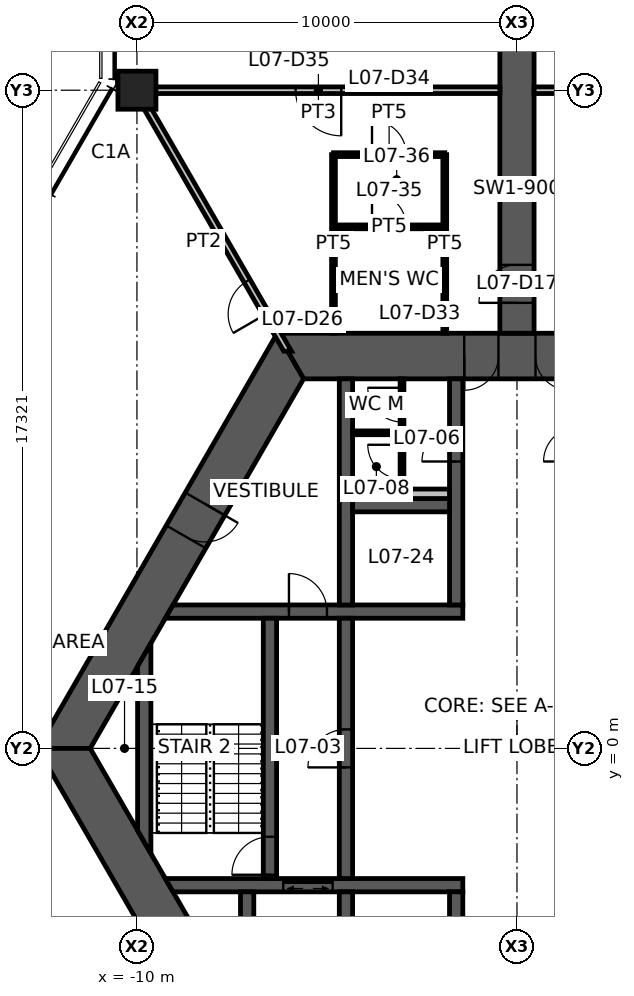
"""IFC4 building model, lengths in metres.
Left out: names, types, materials, properties, quantities, classifications, styles, units other than length and angle.
Written with IfcOpenShell. Run it as: python <this file> out.ifc"""

import sys

from ifc_helpers import new_model, si_unit, direction, frame, frame_2d, origin, origin_2d, place, context, subcontext, project, spatial, polyline, rectangle, hollow_rectangle, outline, extrude, element, fill, save


model = new_model("IFC4")
c1 = context("Model", 3, precision=1e-05, world=origin(), true_north=direction((0.0, 1.0)))
c2 = subcontext(c1, "Body", "Model", "MODEL_VIEW")
j1 = project(units=[si_unit("LENGTHUNIT", "METRE"), si_unit("PLANEANGLEUNIT", "RADIAN")], contexts=[c1])
p1 = place(None, origin())
s1 = spatial("IfcSite", under=j1, at=p1, CompositionType="ELEMENT")
p2 = place(p1, origin())
s2 = spatial("IfcBuilding", under=s1, at=p2, CompositionType="ELEMENT")
p3 = place(p2, frame((0.0, 0.0, 26.8)))
s3 = spatial("IfcBuildingStorey", under=s2, at=p3, CompositionType="ELEMENT", Elevation=26.8)
p4 = place(p3, frame((-10.0, 17.321, 0.0), z_axis=(0.0, 0.0, 1.0), x_axis=(1.0, 0.0, 0.0)))
e1 = element("IfcColumn", 1, at=p4, inside=s3, PredefinedType="COLUMN", context=c2, shape_type="SweptSolid", body=[
    extrude(hollow_rectangle(XDim=1.0, YDim=1.0, WallThickness=0.06, at=origin_2d()), origin(), (0.0, 0.0, 1.0), 4.2),
])
p5 = place(p3, frame((5.961, 10.325, 0.0), z_axis=(0.0, 0.0, 1.0), x_axis=(-1.0, 0.0, 0.0)))
e2 = element("IfcWall", 2, at=p5, inside=s3, PredefinedType="SHEAR", context=c2, shape_type="SweptSolid", body=[
    extrude(outline(polyline([(-0.346, -0.6), (4.574, -0.6), (5.474, -0.6), (6.449, -0.6), (7.349, -0.6), (12.269, -0.6), (11.576, 0.6), (7.349, 0.6), (6.449, 0.6), (5.474, 0.6), (4.574, 0.6), (0.346, 0.6), (-0.346, -0.6)])), origin(), (0.0, 0.0, 1.0), 4.2),
])
p6 = place(p5, frame((6.449, 0.0, 0.0)))
e3 = element("IfcOpeningElement", 3, at=p6, cuts=e2, PredefinedType="OPENING", context=c2, shape_type="SweptSolid", body=[
    extrude(rectangle(XDim=0.9, YDim=2.1, at=frame_2d((0.45, 1.05))), frame((0.0, 0.61, 0.0), z_axis=(0.0, -1.0, 0.0), x_axis=(1.0, 0.0, 0.0)), (0.0, 0.0, 1.0), 1.22),
])
p7 = place(p5, frame((4.574, 0.0, 0.0)))
e4 = element("IfcOpeningElement", 4, at=p7, cuts=e2, PredefinedType="OPENING", context=c2, shape_type="SweptSolid", body=[
    extrude(rectangle(XDim=0.9, YDim=2.1, at=frame_2d((0.45, 1.05))), frame((0.0, 0.61, 0.0), z_axis=(0.0, -1.0, 0.0), x_axis=(1.0, 0.0, 0.0)), (0.0, 0.0, 1.0), 1.22),
])
p8 = place(p3, frame((-5.961, 10.325, 0.0), z_axis=(0.0, 0.0, 1.0), x_axis=(-0.500004296715, -0.866022923061, 0.0)))
e5 = element("IfcWall", 5, at=p8, inside=s3, PredefinedType="SHEAR", context=c2, shape_type="SweptSolid", body=[
    extrude(outline(polyline([(-0.346, -0.6), (4.494, -0.6), (5.494, -0.6), (12.269, -0.6), (11.576, 0.6), (5.494, 0.6), (4.494, 0.6), (0.346, 0.6), (-0.346, -0.6)])), origin(), (0.0, 0.0, 1.0), 4.2),
])
p9 = place(p8, frame((4.494, 0.0, 0.0)))
e6 = element("IfcOpeningElement", 6, at=p9, cuts=e5, PredefinedType="OPENING", context=c2, shape_type="SweptSolid", body=[
    extrude(rectangle(XDim=1.0, YDim=2.1, at=frame_2d((0.5, 1.05))), frame((0.0, 0.61, 0.0), z_axis=(0.0, -1.0, 0.0), x_axis=(1.0, 0.0, 0.0)), (0.0, 0.0, 1.0), 1.22),
])
p10 = place(p3, frame((-11.922, 0.0, 0.0), z_axis=(0.0, 0.0, 1.0), x_axis=(0.500004296715, -0.866022923061, 0.0)))
e7 = element("IfcWall", 7, at=p10, inside=s3, PredefinedType="SHEAR", context=c2, shape_type="SweptSolid", body=[
    extrude(outline(polyline([(-0.346, -0.6), (6.431, -0.6), (7.231, -0.6), (12.269, -0.6), (11.576, 0.6), (7.231, 0.6), (6.431, 0.6), (0.346, 0.6), (-0.346, -0.6)])), origin(), (0.0, 0.0, 1.0), 4.2),
])
p11 = place(p10, frame((6.431, 0.0, 0.0)))
e8 = element("IfcOpeningElement", 8, at=p11, cuts=e7, PredefinedType="OPENING", context=c2, shape_type="SweptSolid", body=[
    extrude(rectangle(XDim=0.8, YDim=2.1, at=frame_2d((0.4, 1.05))), frame((0.0, 0.61, 0.0), z_axis=(0.0, -1.0, 0.0), x_axis=(1.0, 0.0, 0.0)), (0.0, 0.0, 1.0), 1.22),
])
p12 = place(p3, frame((0.0, 10.925, 0.0), z_axis=(0.0, 0.0, 1.0), x_axis=(0.0, 1.0, 0.0)))
e9 = element("IfcWall", 9, at=p12, inside=s3, PredefinedType="SHEAR", context=c2, shape_type="SweptSolid", body=[
    extrude(rectangle(XDim=7.595, YDim=0.9, at=frame_2d((3.798, 0.0))), origin(), (0.0, 0.0, 1.0), 4.2),
])
p13 = place(p12, frame((0.8, 0.0, 0.0)))
e10 = element("IfcOpeningElement", 10, at=p13, cuts=e9, PredefinedType="OPENING", context=c2, shape_type="SweptSolid", body=[
    extrude(rectangle(XDim=1.0, YDim=2.1, at=frame_2d((0.5, 1.05))), frame((0.0, 0.46, 0.0), z_axis=(0.0, -1.0, 0.0), x_axis=(1.0, 0.0, 0.0)), (0.0, 0.0, 1.0), 0.92),
])
p14 = place(p3, frame((-9.151, 3.6, 0.0), z_axis=(0.0, 0.0, 1.0), x_axis=(1.0, 0.0, 0.0)))
e11 = element("IfcWall", 11, at=p14, inside=s3, PredefinedType="SHEAR", context=c2, shape_type="SweptSolid", body=[
    extrude(outline(polyline([(-0.101, -0.175), (3.151, -0.175), (4.151, -0.175), (7.726, -0.175), (7.726, 0.175), (4.151, 0.175), (3.151, 0.175), (0.101, 0.175), (-0.101, -0.175)])), origin(), (0.0, 0.0, 1.0), 4.2),
])
p15 = place(p14, frame((3.151, 0.0, 0.0)))
e12 = element("IfcOpeningElement", 12, at=p15, cuts=e11, PredefinedType="OPENING", context=c2, shape_type="SweptSolid", body=[
    extrude(rectangle(XDim=1.0, YDim=2.1, at=frame_2d((0.5, 1.05))), frame((0.0, 0.185, 0.0), z_axis=(0.0, -1.0, 0.0), x_axis=(1.0, 0.0, 0.0)), (0.0, 0.0, 1.0), 0.37),
])
p16 = place(p3, frame((-9.151, -3.6, 0.0), z_axis=(0.0, 0.0, 1.0), x_axis=(1.0, 0.0, 0.0)))
e13 = element("IfcWall", 13, at=p16, inside=s3, PredefinedType="SHEAR", context=c2, shape_type="SweptSolid", body=[
    extrude(outline(polyline([(0.101, -0.175), (3.001, -0.175), (4.301, -0.175), (7.726, -0.175), (7.726, 0.175), (4.301, 0.175), (3.001, 0.175), (-0.101, 0.175), (0.101, -0.175)])), origin(), (0.0, 0.0, 1.0), 4.2),
])
p17 = place(p16, frame((3.001, 0.0, 0.0)))
e14 = element("IfcOpeningElement", 14, at=p17, cuts=e13, PredefinedType="OPENING", context=c2, shape_type="SweptSolid", body=[
    extrude(rectangle(XDim=1.3, YDim=2.1, at=frame_2d((0.65, 1.05))), frame((0.0, 0.185, 0.0), z_axis=(0.0, -1.0, 0.0), x_axis=(1.0, 0.0, 0.0)), (0.0, 0.0, 1.0), 0.37),
])
p18 = place(p3, frame((-1.6, 3.775, 0.0), z_axis=(0.0, 0.0, 1.0), x_axis=(0.0, 1.0, 0.0)))
e15 = element("IfcWall", 15, at=p18, inside=s3, PredefinedType="SHEAR", context=c2, shape_type="SweptSolid", body=[
    extrude(rectangle(XDim=5.95, YDim=0.35, at=frame_2d((2.975, 0.0))), origin(), (0.0, 0.0, 1.0), 4.2),
])
p19 = place(p18, frame((3.775, 0.0, 0.0)))
e16 = element("IfcOpeningElement", 16, at=p19, cuts=e15, PredefinedType="OPENING", context=c2, shape_type="SweptSolid", body=[
    extrude(rectangle(XDim=0.9, YDim=2.1, at=frame_2d((0.45, 1.05))), frame((0.0, 0.185, 0.0), z_axis=(0.0, -1.0, 0.0), x_axis=(1.0, 0.0, 0.0)), (0.0, 0.0, 1.0), 0.37),
])
p20 = place(p3, frame((-1.6, -3.775, 0.0), z_axis=(0.0, 0.0, 1.0), x_axis=(0.0, -1.0, 0.0)))
e17 = element("IfcWall", 17, at=p20, inside=s3, PredefinedType="SHEAR", context=c2, shape_type="SweptSolid", body=[
    extrude(rectangle(XDim=5.95, YDim=0.35, at=frame_2d((2.975, 0.0))), origin(), (0.0, 0.0, 1.0), 4.2),
])
p21 = place(p20, frame((3.775, 0.0, 0.0)))
e18 = element("IfcOpeningElement", 18, at=p21, cuts=e17, PredefinedType="OPENING", context=c2, shape_type="SweptSolid", body=[
    extrude(rectangle(XDim=0.9, YDim=2.1, at=frame_2d((0.45, 1.05))), frame((0.0, 0.185, 0.0), z_axis=(0.0, -1.0, 0.0), x_axis=(1.0, 0.0, 0.0)), (0.0, 0.0, 1.0), 0.37),
])
p22 = place(p3, frame((-4.5, -3.425, 0.0), z_axis=(0.0, 0.0, 1.0), x_axis=(0.0, 1.0, 0.0)))
e19 = element("IfcWall", 19, at=p22, inside=s3, PredefinedType="SHEAR", context=c2, shape_type="SweptSolid", body=[
    extrude(rectangle(XDim=6.85, YDim=0.35, at=frame_2d((3.425, 0.0))), origin(), (0.0, 0.0, 1.0), 4.2),
])
p23 = place(p22, frame((2.925, 0.0, 0.0)))
e20 = element("IfcOpeningElement", 20, at=p23, cuts=e19, PredefinedType="OPENING", context=c2, shape_type="SweptSolid", body=[
    extrude(rectangle(XDim=1.0, YDim=2.1, at=frame_2d((0.5, 1.05))), frame((0.0, 0.185, 0.0), z_axis=(0.0, -1.0, 0.0), x_axis=(1.0, 0.0, 0.0)), (0.0, 0.0, 1.0), 0.37),
])
p24 = place(p3, frame((-6.5, -3.425, 0.0), z_axis=(0.0, 0.0, 1.0), x_axis=(0.0, 1.0, 0.0)))
e21 = element("IfcWall", 21, at=p24, inside=s3, PredefinedType="SHEAR", context=c2, shape_type="SweptSolid", body=[
    extrude(rectangle(XDim=6.85, YDim=0.35, at=frame_2d((3.425, 0.0))), origin(), (0.0, 0.0, 1.0), 4.2),
])
p25 = place(p24, frame((0.1, 0.0, 0.0)))
e22 = element("IfcOpeningElement", 22, at=p25, cuts=e21, PredefinedType="OPENING", context=c2, shape_type="SweptSolid", body=[
    extrude(rectangle(XDim=1.0, YDim=2.1, at=frame_2d((0.5, 1.05))), frame((0.0, 0.185, 0.0), z_axis=(0.0, -1.0, 0.0), x_axis=(1.0, 0.0, 0.0)), (0.0, 0.0, 1.0), 0.37),
])
for number, where, z_axis, x_axis in (
    (23, (-4.5, 3.775, 0.0), (0.0, 0.0, 1.0), (0.0, 1.0, 0.0)),
    (24, (-4.5, -3.775, 0.0), (0.0, 0.0, 1.0), (0.0, -1.0, 0.0)),
):
    element("IfcWall", number, at=place(p3, frame(where, z_axis=z_axis, x_axis=x_axis)), inside=s3, PredefinedType="SHEAR", context=c2, shape_type="SweptSolid", body=[
        extrude(rectangle(XDim=5.95, YDim=0.35, at=frame_2d((2.975, 0.0))), origin(), (0.0, 0.0, 1.0), 4.2),
    ])
p26 = place(p3, frame((-4.325, 6.4, 0.0), z_axis=(0.0, 0.0, 1.0), x_axis=(1.0, 0.0, 0.0)))
e25 = element("IfcWall", 25, at=p26, inside=s3, PredefinedType="SHEAR", context=c2, shape_type="SweptSolid", body=[
    extrude(rectangle(XDim=2.55, YDim=0.35, at=frame_2d((1.275, 0.0))), origin(), (0.0, 0.0, 1.0), 4.2),
])
p27 = place(p3, frame((-7.1, -3.775, 0.0), z_axis=(0.0, 0.0, 1.0), x_axis=(0.0, -1.0, 0.0)))
e26 = element("IfcWall", 26, at=p27, inside=s3, PredefinedType="SHEAR", context=c2, shape_type="SweptSolid", body=[
    extrude(outline(polyline([(0.0, -0.175), (3.074, -0.175), (3.377, 0.0), (3.4, 0.175), (0.0, 0.175), (0.0, -0.175)])), origin(), (0.0, 0.0, 1.0), 4.2),
])
p28 = place(p3, frame((-9.808, -2.462, 0.0), z_axis=(0.0, 0.0, 1.0), x_axis=(0.0, 1.0, 0.0)))
e27 = element("IfcWall", 27, at=p28, inside=s3, PredefinedType="SHEAR", context=c2, shape_type="SweptSolid", body=[
    extrude(outline(polyline([(-0.303, -0.175), (5.228, -0.175), (4.621, 0.175), (0.303, 0.175), (-0.303, -0.175)])), origin(), (0.0, 0.0, 1.0), 4.2),
])
p29 = place(p3, frame((-4.325, 6.7, 0.0), z_axis=(0.0, 0.0, 1.0), x_axis=(1.0, 0.0, 0.0)))
e28 = element("IfcWall", 28, at=p29, inside=s3, PredefinedType="PLUMBINGWALL", context=c2, shape_type="SweptSolid", body=[
    extrude(rectangle(XDim=2.55, YDim=0.25, at=frame_2d((1.275, 0.0))), origin(), (0.0, 0.0, 1.0), 4.2),
])
p30 = place(p3, frame((-3.025, 6.575, 0.0), z_axis=(0.0, 0.0, 1.0), x_axis=(0.0, 1.0, 0.0)))
e29 = element("IfcWall", 29, at=p30, inside=s3, PredefinedType="PARTITIONING", context=c2, shape_type="SweptSolid", body=[
    extrude(rectangle(XDim=3.15, YDim=0.1, at=frame_2d((1.575, 0.0))), origin(), (0.0, 0.0, 1.0), 3.23),
])
p31 = place(p30, frame((2.015, 0.0, 0.0)))
e30 = element("IfcOpeningElement", 30, at=p31, cuts=e29, PredefinedType="OPENING", context=c2, shape_type="SweptSolid", body=[
    extrude(rectangle(XDim=0.9, YDim=2.1, at=frame_2d((0.45, 1.05))), frame((0.0, 0.06, 0.0), z_axis=(0.0, -1.0, 0.0), x_axis=(1.0, 0.0, 0.0)), (0.0, 0.0, 1.0), 0.12),
])
p32 = place(p30, frame((0.515, 0.0, 0.0)))
e31 = element("IfcOpeningElement", 31, at=p32, cuts=e29, PredefinedType="OPENING", context=c2, shape_type="SweptSolid", body=[
    extrude(rectangle(XDim=0.9, YDim=2.1, at=frame_2d((0.45, 1.05))), frame((0.0, 0.06, 0.0), z_axis=(0.0, -1.0, 0.0), x_axis=(1.0, 0.0, 0.0)), (0.0, 0.0, 1.0), 0.12),
])
p33 = place(p3, frame((-3.075, 8.305, 0.0), z_axis=(0.0, 0.0, 1.0), x_axis=(-1.0, 0.0, 0.0)))
e32 = element("IfcWall", 32, at=p33, inside=s3, PredefinedType="PARTITIONING", context=c2, shape_type="SweptSolid", body=[
    extrude(rectangle(XDim=1.25, YDim=0.1, at=frame_2d((0.625, 0.0))), origin(), (0.0, 0.0, 1.0), 3.23),
])
p34 = place(p3, frame((-6.035, 10.453, 0.0), z_axis=(0.0, 0.0, 1.0), x_axis=(-0.499993402427, 0.866029212861, 0.0)))
e33 = element("IfcWall", 33, at=p34, inside=s3, PredefinedType="PARTITIONING", context=c2, shape_type="SweptSolid", body=[
    extrude(outline(polyline([(-0.051, -0.087), (1.129, -0.087), (2.129, -0.087), (7.93, -0.087), (7.93, 0.087), (2.129, 0.087), (1.129, 0.087), (0.051, 0.087), (-0.051, -0.087)])), origin(), (0.0, 0.0, 1.0), 3.33),
])
p35 = place(p34, frame((1.129, 0.0, 0.0)))
e34 = element("IfcOpeningElement", 34, at=p35, cuts=e33, PredefinedType="OPENING", context=c2, shape_type="SweptSolid", body=[
    extrude(rectangle(XDim=1.0, YDim=2.1, at=frame_2d((0.5, 1.05))), frame((0.0, 0.098, 0.0), z_axis=(0.0, -1.0, 0.0), x_axis=(1.0, 0.0, 0.0)), (0.0, 0.0, 1.0), 0.195),
])
p36 = place(p3, frame((0.45, 17.321, 0.0), z_axis=(0.0, 0.0, 1.0), x_axis=(1.0, 0.0, 0.0)))
e35 = element("IfcWall", 35, at=p36, inside=s3, PredefinedType="PARTITIONING", context=c2, shape_type="SweptSolid", body=[
    extrude(rectangle(XDim=9.55, YDim=0.175, at=frame_2d((4.775, 0.0))), origin(), (0.0, 0.0, 1.0), 3.238),
])
p37 = place(p36, frame((4.175, 0.0, 0.0)))
e36 = element("IfcOpeningElement", 36, at=p37, cuts=e35, PredefinedType="OPENING", context=c2, shape_type="SweptSolid", body=[
    extrude(rectangle(XDim=1.2, YDim=2.1, at=frame_2d((0.6, 1.05))), frame((0.0, 0.098, 0.0), z_axis=(0.0, -1.0, 0.0), x_axis=(1.0, 0.0, 0.0)), (0.0, 0.0, 1.0), 0.195),
])
p38 = place(p3, frame((-4.829, 13.725, 0.0), z_axis=(0.0, 0.0, 1.0), x_axis=(1.0, 0.0, 0.0)))
e37 = element("IfcWall", 37, at=p38, inside=s3, PredefinedType="PARTITIONING", context=c2, shape_type="SweptSolid", body=[
    extrude(rectangle(XDim=2.929, YDim=0.1, at=frame_2d((1.464, 0.0))), origin(), (0.0, 0.0, 1.0), 3.23),
])
p39 = place(p38, frame((1.014, 0.0, 0.0)))
e38 = element("IfcOpeningElement", 38, at=p39, cuts=e37, PredefinedType="OPENING", context=c2, shape_type="SweptSolid", body=[
    extrude(rectangle(XDim=0.9, YDim=2.1, at=frame_2d((0.45, 1.05))), frame((0.0, 0.06, 0.0), z_axis=(0.0, -1.0, 0.0), x_axis=(1.0, 0.0, 0.0)), (0.0, 0.0, 1.0), 0.12),
])
p40 = place(p3, frame((-4.829, 15.625, 0.0), z_axis=(0.0, 0.0, 1.0), x_axis=(1.0, 0.0, 0.0)))
e39 = element("IfcWall", 39, at=p40, inside=s3, PredefinedType="PARTITIONING", context=c2, shape_type="SweptSolid", body=[
    extrude(rectangle(XDim=2.929, YDim=0.1, at=frame_2d((1.464, 0.0))), origin(), (0.0, 0.0, 1.0), 3.23),
])
p41 = place(p40, frame((1.014, 0.0, 0.0)))
e40 = element("IfcOpeningElement", 40, at=p41, cuts=e39, PredefinedType="OPENING", context=c2, shape_type="SweptSolid", body=[
    extrude(rectangle(XDim=0.9, YDim=2.1, at=frame_2d((0.45, 1.05))), frame((0.0, 0.06, 0.0), z_axis=(0.0, -1.0, 0.0), x_axis=(1.0, 0.0, 0.0)), (0.0, 0.0, 1.0), 0.12),
])
for number, where, z_axis, x_axis in (
    (41, (-1.9, 10.925, 0.0), (0.0, 0.0, 1.0), (0.0, 1.0, 0.0)),
    (42, (-4.829, 10.925, 0.0), (0.0, 0.0, 1.0), (0.0, 1.0, 0.0)),
):
    element("IfcWall", number, at=place(p3, frame(where, z_axis=z_axis, x_axis=x_axis)), inside=s3, PredefinedType="PARTITIONING", context=c2, shape_type="SweptSolid", body=[
        extrude(rectangle(XDim=4.7, YDim=0.1, at=frame_2d((2.35, 0.0))), origin(), (0.0, 0.0, 1.0), 3.23),
    ])
p42 = place(p3, frame((-0.45, 17.321, 0.0), z_axis=(0.0, 0.0, 1.0), x_axis=(-1.0, 0.0, 0.0)))
e43 = element("IfcWall", 43, at=p42, inside=s3, PredefinedType="PARTITIONING", context=c2, shape_type="SweptSolid", body=[
    extrude(rectangle(XDim=9.55, YDim=0.175, at=frame_2d((4.775, 0.0))), origin(), (0.0, 0.0, 1.0), 3.238),
])
p43 = place(p42, frame((4.175, 0.0, 0.0)))
e44 = element("IfcOpeningElement", 44, at=p43, cuts=e43, PredefinedType="OPENING", context=c2, shape_type="SweptSolid", body=[
    extrude(rectangle(XDim=1.2, YDim=2.1, at=frame_2d((0.6, 1.05))), frame((0.0, 0.098, 0.0), z_axis=(0.0, -1.0, 0.0), x_axis=(1.0, 0.0, 0.0)), (0.0, 0.0, 1.0), 0.195),
])
p44 = place(p6, origin())
e45 = element("IfcDoor", 45, at=p44, inside=s3, OperationType="SINGLE_SWING_RIGHT", PredefinedType="DOOR", context=c2, shape_type="SweptSolid", body=[
    extrude(rectangle(XDim=0.9, YDim=2.1, at=frame_2d((0.45, 1.05))), frame((0.0, 0.025, 0.0), z_axis=(0.0, -1.0, 0.0), x_axis=(1.0, 0.0, 0.0)), (0.0, 0.0, 1.0), 0.05),
])
fill(e3, e45)
p45 = place(p7, origin())
e46 = element("IfcDoor", 46, at=p45, inside=s3, OperationType="SINGLE_SWING_LEFT", PredefinedType="DOOR", context=c2, shape_type="SweptSolid", body=[
    extrude(rectangle(XDim=0.9, YDim=2.1, at=frame_2d((0.45, 1.05))), frame((0.0, 0.025, 0.0), z_axis=(0.0, -1.0, 0.0), x_axis=(1.0, 0.0, 0.0)), (0.0, 0.0, 1.0), 0.05),
])
fill(e4, e46)
p46 = place(p9, origin())
e47 = element("IfcDoor", 47, at=p46, inside=s3, OperationType="SINGLE_SWING_LEFT", PredefinedType="DOOR", context=c2, shape_type="SweptSolid", body=[
    extrude(rectangle(XDim=1.0, YDim=2.1, at=frame_2d((0.5, 1.05))), frame((0.0, 0.025, 0.0), z_axis=(0.0, -1.0, 0.0), x_axis=(1.0, 0.0, 0.0)), (0.0, 0.0, 1.0), 0.05),
])
fill(e6, e47)
p47 = place(p23, origin())
e48 = element("IfcDoor", 48, at=p47, inside=s3, OperationType="SINGLE_SWING_LEFT", PredefinedType="DOOR", context=c2, shape_type="SweptSolid", body=[
    extrude(rectangle(XDim=1.0, YDim=2.1, at=frame_2d((0.5, 1.05))), frame((0.0, 0.025, 0.0), z_axis=(0.0, -1.0, 0.0), x_axis=(1.0, 0.0, 0.0)), (0.0, 0.0, 1.0), 0.05),
])
fill(e20, e48)
p48 = place(p25, origin())
e49 = element("IfcDoor", 49, at=p48, inside=s3, OperationType="SINGLE_SWING_LEFT", PredefinedType="DOOR", context=c2, shape_type="SweptSolid", body=[
    extrude(rectangle(XDim=1.0, YDim=2.1, at=frame_2d((0.5, 1.05))), frame((0.0, 0.025, 0.0), z_axis=(0.0, -1.0, 0.0), x_axis=(1.0, 0.0, 0.0)), (0.0, 0.0, 1.0), 0.05),
])
fill(e22, e49)
p49 = place(p15, origin())
e50 = element("IfcDoor", 50, at=p49, inside=s3, OperationType="SINGLE_SWING_LEFT", PredefinedType="DOOR", context=c2, shape_type="SweptSolid", body=[
    extrude(rectangle(XDim=1.0, YDim=2.1, at=frame_2d((0.5, 1.05))), frame((0.0, 0.025, 0.0), z_axis=(0.0, -1.0, 0.0), x_axis=(1.0, 0.0, 0.0)), (0.0, 0.0, 1.0), 0.05),
])
fill(e12, e50)
p50 = place(p19, origin())
e51 = element("IfcDoor", 51, at=p50, inside=s3, OperationType="SINGLE_SWING_LEFT", PredefinedType="DOOR", context=c2, shape_type="SweptSolid", body=[
    extrude(rectangle(XDim=0.9, YDim=2.1, at=frame_2d((0.45, 1.05))), frame((0.0, 0.025, 0.0), z_axis=(0.0, -1.0, 0.0), x_axis=(1.0, 0.0, 0.0)), (0.0, 0.0, 1.0), 0.05),
])
fill(e16, e51)
p51 = place(p13, origin())
e52 = element("IfcDoor", 52, at=p51, inside=s3, OperationType="SINGLE_SWING_LEFT", PredefinedType="DOOR", context=c2, shape_type="SweptSolid", body=[
    extrude(rectangle(XDim=1.0, YDim=2.1, at=frame_2d((0.5, 1.05))), frame((0.0, 0.025, 0.0), z_axis=(0.0, -1.0, 0.0), x_axis=(1.0, 0.0, 0.0)), (0.0, 0.0, 1.0), 0.05),
])
fill(e10, e52)
p52 = place(p31, origin())
e53 = element("IfcDoor", 53, at=p52, inside=s3, OperationType="SINGLE_SWING_RIGHT", PredefinedType="DOOR", context=c2, shape_type="SweptSolid", body=[
    extrude(rectangle(XDim=0.9, YDim=2.1, at=frame_2d((0.45, 1.05))), frame((0.0, 0.025, 0.0), z_axis=(0.0, -1.0, 0.0), x_axis=(1.0, 0.0, 0.0)), (0.0, 0.0, 1.0), 0.05),
])
fill(e30, e53)
p53 = place(p32, origin())
e54 = element("IfcDoor", 54, at=p53, inside=s3, OperationType="SINGLE_SWING_RIGHT", PredefinedType="DOOR", context=c2, shape_type="SweptSolid", body=[
    extrude(rectangle(XDim=0.9, YDim=2.1, at=frame_2d((0.45, 1.05))), frame((0.0, 0.025, 0.0), z_axis=(0.0, -1.0, 0.0), x_axis=(1.0, 0.0, 0.0)), (0.0, 0.0, 1.0), 0.05),
])
fill(e31, e54)
p54 = place(p35, origin())
e55 = element("IfcDoor", 55, at=p54, inside=s3, OperationType="SINGLE_SWING_LEFT", PredefinedType="DOOR", context=c2, shape_type="SweptSolid", body=[
    extrude(rectangle(XDim=1.0, YDim=2.1, at=frame_2d((0.5, 1.05))), frame((0.0, 0.025, 0.0), z_axis=(0.0, -1.0, 0.0), x_axis=(1.0, 0.0, 0.0)), (0.0, 0.0, 1.0), 0.05),
])
fill(e34, e55)
p55 = place(p39, origin())
e56 = element("IfcDoor", 56, at=p55, inside=s3, OperationType="SINGLE_SWING_LEFT", PredefinedType="DOOR", context=c2, shape_type="SweptSolid", body=[
    extrude(rectangle(XDim=0.9, YDim=2.1, at=frame_2d((0.45, 1.05))), frame((0.0, 0.025, 0.0), z_axis=(0.0, -1.0, 0.0), x_axis=(1.0, 0.0, 0.0)), (0.0, 0.0, 1.0), 0.05),
])
fill(e38, e56)
p56 = place(p41, origin())
e57 = element("IfcDoor", 57, at=p56, inside=s3, OperationType="SINGLE_SWING_LEFT", PredefinedType="DOOR", context=c2, shape_type="SweptSolid", body=[
    extrude(rectangle(XDim=0.9, YDim=2.1, at=frame_2d((0.45, 1.05))), frame((0.0, 0.025, 0.0), z_axis=(0.0, -1.0, 0.0), x_axis=(1.0, 0.0, 0.0)), (0.0, 0.0, 1.0), 0.05),
])
fill(e40, e57)
p57 = place(p43, origin())
e58 = element("IfcDoor", 58, at=p57, inside=s3, OperationType="DOUBLE_DOOR_SINGLE_SWING", PredefinedType="DOOR", context=c2, shape_type="SweptSolid", body=[
    extrude(rectangle(XDim=1.2, YDim=2.1, at=frame_2d((0.6, 1.05))), frame((0.0, 0.025, 0.0), z_axis=(0.0, -1.0, 0.0), x_axis=(1.0, 0.0, 0.0)), (0.0, 0.0, 1.0), 0.05),
])
fill(e44, e58)
p58 = place(p17, origin())
e59 = element("IfcDoor", 59, at=p58, inside=s3, OperationType="DOUBLE_DOOR_SLIDING", PredefinedType="DOOR", context=c2, shape_type="SweptSolid", body=[
    extrude(rectangle(XDim=1.3, YDim=2.1, at=frame_2d((0.65, 1.05))), frame((0.0, 0.025, 0.0), z_axis=(0.0, -1.0, 0.0), x_axis=(1.0, 0.0, 0.0)), (0.0, 0.0, 1.0), 0.05),
])
fill(e14, e59)
save(model, sys.argv[1])
